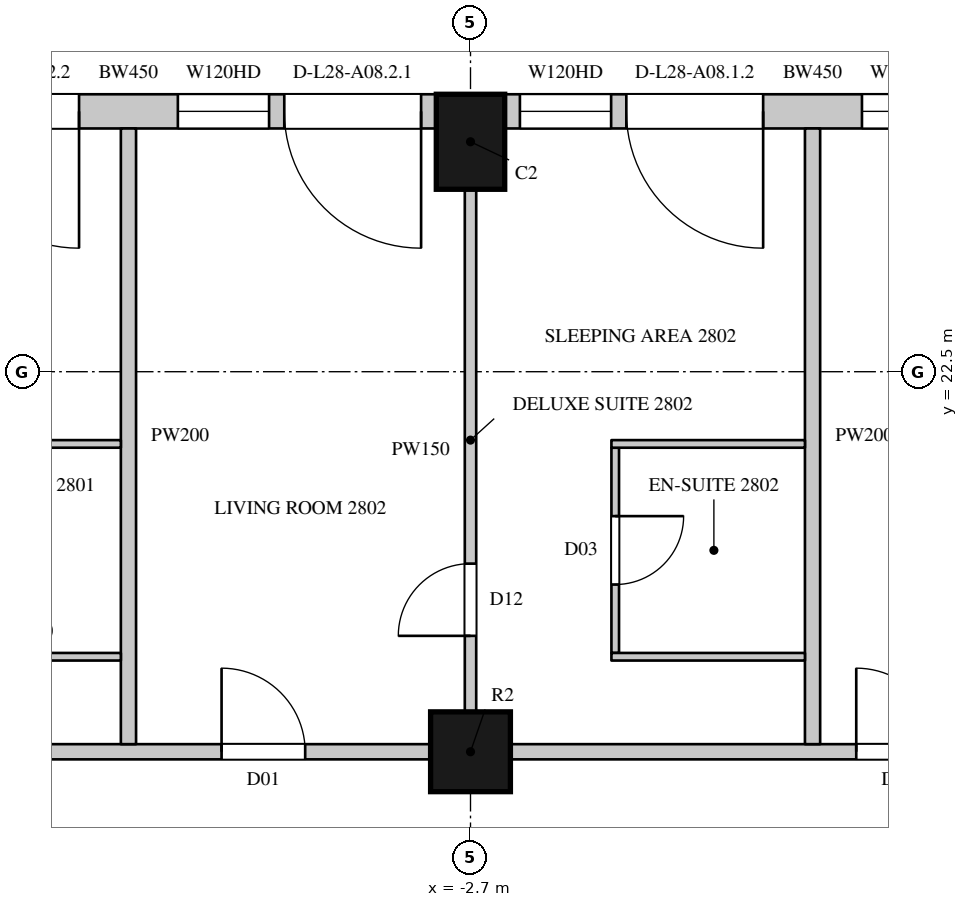
"""IFC4 building model, lengths in metres.
Left out: names, types, materials, properties, quantities, classifications, styles, units other than length and angle.
Written with IfcOpenShell. Run it as: python <this file> out.ifc"""

import sys

from ifc_helpers import new_model, si_unit, direction, frame, frame_2d, origin, origin_2d, place, context, subcontext, project, spatial, rectangle, circle, extrude, element, fill, save


model = new_model("IFC4")
c1 = context("Model", 3, precision=1e-05, world=origin(), true_north=direction((0.0, 1.0)))
c2 = subcontext(c1, "Body", "Model", "MODEL_VIEW")
j1 = project(units=[si_unit("LENGTHUNIT", "METRE"), si_unit("PLANEANGLEUNIT", "RADIAN")], contexts=[c1])
p1 = place(None, origin())
s1 = spatial("IfcSite", under=j1, at=p1, CompositionType="ELEMENT")
p2 = place(p1, origin())
s2 = spatial("IfcBuilding", under=s1, at=p2, CompositionType="ELEMENT")
p3 = place(p2, frame((0.0, 0.0, 131.1)))
s3 = spatial("IfcBuildingStorey", under=s2, at=p3, CompositionType="ELEMENT", Elevation=131.1)
p4 = place(p3, frame((-2.7, 25.525, 0.0), z_axis=(0.0, 0.0, 1.0), x_axis=(-1.0, 0.0, 0.0)))
e1 = element("IfcColumn", 1, at=p4, inside=s3, PredefinedType="COLUMN", context=c2, shape_type="SweptSolid", body=[
    extrude(rectangle(XDim=0.9, YDim=1.25, at=origin_2d()), origin(), (0.0, 0.0, 1.0), 3.6),
])
p5 = place(p3, frame((-2.7, 17.5, 0.0), z_axis=(0.0, 0.0, 1.0), x_axis=(1.0, 0.0, 0.0)))
e2 = element("IfcColumn", 2, at=p5, inside=s3, PredefinedType="COLUMN", context=c2, shape_type="SweptSolid", body=[
    extrude(circle(Radius=0.525, at=origin_2d()), origin(), (0.0, 0.0, 1.0), 3.6),
])
p6 = place(p3, frame((5.85, 25.925, 0.0), z_axis=(0.0, 0.0, 1.0), x_axis=(-1.0, 0.0, 0.0)))
e3 = element("IfcWall", 3, at=p6, inside=s3, PredefinedType="SOLIDWALL", context=c2, shape_type="SweptSolid", body=[
    extrude(rectangle(XDim=8.1, YDim=0.45, at=frame_2d((4.05, 0.0))), origin(), (0.0, 0.0, 1.0), 3.3),
])
p7 = place(p6, frame((0.2, 0.0, 0.0)))
e4 = element("IfcOpeningElement", 4, at=p7, cuts=e3, PredefinedType="OPENING", context=c2, shape_type="SweptSolid", body=[
    extrude(rectangle(XDim=1.8, YDim=2.4, at=frame_2d((0.9, 1.2))), frame((0.0, 0.235, 0.0), z_axis=(0.0, -1.0, 0.0), x_axis=(1.0, 0.0, 0.0)), (0.0, 0.0, 1.0), 0.47),
])
p8 = place(p6, frame((2.2, 0.0, 1.05)))
e5 = element("IfcOpeningElement", 5, at=p8, cuts=e3, PredefinedType="OPENING", context=c2, shape_type="SweptSolid", body=[
    extrude(rectangle(XDim=1.2, YDim=2.0, at=frame_2d((0.6, 1.0))), frame((0.0, 0.235, 0.0), z_axis=(0.0, -1.0, 0.0), x_axis=(1.0, 0.0, 0.0)), (0.0, 0.0, 1.0), 0.47),
])
p9 = place(p6, frame((4.7, 0.0, 0.0)))
e6 = element("IfcOpeningElement", 6, at=p9, cuts=e3, PredefinedType="OPENING", context=c2, shape_type="SweptSolid", body=[
    extrude(rectangle(XDim=1.8, YDim=2.4, at=frame_2d((0.9, 1.2))), frame((0.0, 0.235, 0.0), z_axis=(0.0, -1.0, 0.0), x_axis=(1.0, 0.0, 0.0)), (0.0, 0.0, 1.0), 0.47),
])
p10 = place(p6, frame((6.7, 0.0, 1.05)))
e7 = element("IfcOpeningElement", 7, at=p10, cuts=e3, PredefinedType="OPENING", context=c2, shape_type="SweptSolid", body=[
    extrude(rectangle(XDim=1.2, YDim=2.0, at=frame_2d((0.6, 1.0))), frame((0.0, 0.235, 0.0), z_axis=(0.0, -1.0, 0.0), x_axis=(1.0, 0.0, 0.0)), (0.0, 0.0, 1.0), 0.47),
])
p11 = place(p3, frame((-3.15, 25.925, 0.0), z_axis=(0.0, 0.0, 1.0), x_axis=(-1.0, 0.0, 0.0)))
e8 = element("IfcWall", 8, at=p11, inside=s3, PredefinedType="SOLIDWALL", context=c2, shape_type="SweptSolid", body=[
    extrude(rectangle(XDim=8.1, YDim=0.45, at=frame_2d((4.05, 0.0))), origin(), (0.0, 0.0, 1.0), 3.3),
])
p12 = place(p11, frame((0.2, 0.0, 0.0)))
e9 = element("IfcOpeningElement", 9, at=p12, cuts=e8, PredefinedType="OPENING", context=c2, shape_type="SweptSolid", body=[
    extrude(rectangle(XDim=1.8, YDim=2.4, at=frame_2d((0.9, 1.2))), frame((0.0, 0.235, 0.0), z_axis=(0.0, -1.0, 0.0), x_axis=(1.0, 0.0, 0.0)), (0.0, 0.0, 1.0), 0.47),
])
p13 = place(p11, frame((2.2, 0.0, 1.05)))
e10 = element("IfcOpeningElement", 10, at=p13, cuts=e8, PredefinedType="OPENING", context=c2, shape_type="SweptSolid", body=[
    extrude(rectangle(XDim=1.2, YDim=2.0, at=frame_2d((0.6, 1.0))), frame((0.0, 0.235, 0.0), z_axis=(0.0, -1.0, 0.0), x_axis=(1.0, 0.0, 0.0)), (0.0, 0.0, 1.0), 0.47),
])
p14 = place(p11, frame((4.7, 0.0, 0.0)))
e11 = element("IfcOpeningElement", 11, at=p14, cuts=e8, PredefinedType="OPENING", context=c2, shape_type="SweptSolid", body=[
    extrude(rectangle(XDim=1.8, YDim=2.4, at=frame_2d((0.9, 1.2))), frame((0.0, 0.235, 0.0), z_axis=(0.0, -1.0, 0.0), x_axis=(1.0, 0.0, 0.0)), (0.0, 0.0, 1.0), 0.47),
])
p15 = place(p11, frame((6.7, 0.0, 1.05)))
e12 = element("IfcOpeningElement", 12, at=p15, cuts=e8, PredefinedType="OPENING", context=c2, shape_type="SweptSolid", body=[
    extrude(rectangle(XDim=1.2, YDim=2.0, at=frame_2d((0.6, 1.0))), frame((0.0, 0.235, 0.0), z_axis=(0.0, -1.0, 0.0), x_axis=(1.0, 0.0, 0.0)), (0.0, 0.0, 1.0), 0.47),
])
p16 = place(p3, frame((-11.175, 17.5, 0.0), z_axis=(0.0, 0.0, 1.0), x_axis=(1.0, 0.0, 0.0)))
e13 = element("IfcWall", 13, at=p16, inside=s3, PredefinedType="PARTITIONING", context=c2, shape_type="SweptSolid", body=[
    extrude(rectangle(XDim=7.95, YDim=0.2, at=frame_2d((3.975, 0.0))), origin(), (0.0, 0.0, 1.0), 2.75),
])
p17 = place(p16, frame((5.2, 0.0, 0.0)))
e14 = element("IfcOpeningElement", 14, at=p17, cuts=e13, PredefinedType="OPENING", context=c2, shape_type="SweptSolid", body=[
    extrude(rectangle(XDim=1.1, YDim=2.4, at=frame_2d((0.55, 1.2))), frame((0.0, 0.11, 0.0), z_axis=(0.0, -1.0, 0.0), x_axis=(1.0, 0.0, 0.0)), (0.0, 0.0, 1.0), 0.22),
])
p18 = place(p3, frame((-2.175, 17.5, 0.0), z_axis=(0.0, 0.0, 1.0), x_axis=(1.0, 0.0, 0.0)))
e15 = element("IfcWall", 15, at=p18, inside=s3, PredefinedType="PARTITIONING", context=c2, shape_type="SweptSolid", body=[
    extrude(rectangle(XDim=7.95, YDim=0.2, at=frame_2d((3.975, 0.0))), origin(), (0.0, 0.0, 1.0), 2.75),
])
p19 = place(p18, frame((4.55, 0.0, 0.0)))
e16 = element("IfcOpeningElement", 16, at=p19, cuts=e15, PredefinedType="OPENING", context=c2, shape_type="SweptSolid", body=[
    extrude(rectangle(XDim=1.1, YDim=2.4, at=frame_2d((0.55, 1.2))), frame((0.0, 0.11, 0.0), z_axis=(0.0, -1.0, 0.0), x_axis=(1.0, 0.0, 0.0)), (0.0, 0.0, 1.0), 0.22),
])
p20 = place(p3, frame((-2.7, 18.025, 0.0), z_axis=(0.0, 0.0, 1.0), x_axis=(0.0, 1.0, 0.0)))
e17 = element("IfcWall", 17, at=p20, inside=s3, PredefinedType="PARTITIONING", context=c2, shape_type="SweptSolid", body=[
    extrude(rectangle(XDim=6.875, YDim=0.15, at=frame_2d((3.438, 0.0))), origin(), (0.0, 0.0, 1.0), 2.75),
])
p21 = place(p20, frame((1.0, 0.0, 0.0)))
e18 = element("IfcOpeningElement", 18, at=p21, cuts=e17, PredefinedType="OPENING", context=c2, shape_type="SweptSolid", body=[
    extrude(rectangle(XDim=0.95, YDim=2.2, at=frame_2d((0.475, 1.1))), frame((0.0, 0.085, 0.0), z_axis=(0.0, -1.0, 0.0), x_axis=(1.0, 0.0, 0.0)), (0.0, 0.0, 1.0), 0.17),
])
for number, where, z_axis, x_axis in (
    (19, (-7.2, 17.6, 0.0), (0.0, 0.0, 1.0), (0.0, 1.0, 0.0)),
    (20, (1.8, 17.6, 0.0), (0.0, 0.0, 1.0), (0.0, 1.0, 0.0)),
):
    element("IfcWall", number, at=place(p3, frame(where, z_axis=z_axis, x_axis=x_axis)), inside=s3, PredefinedType="PARTITIONING", context=c2, shape_type="SweptSolid", body=[
        extrude(rectangle(XDim=8.1, YDim=0.2, at=frame_2d((4.05, 0.0))), origin(), (0.0, 0.0, 1.0), 2.65),
    ])
for number, where, z_axis, x_axis in (
    (21, (-9.846, 18.75, 0.0), (0.0, 0.0, 1.0), (1.0, 0.0, 0.0)),
    (22, (-9.846, 21.55, 0.0), (0.0, 0.0, 1.0), (1.0, 0.0, 0.0)),
):
    element("IfcWall", number, at=place(p3, frame(where, z_axis=z_axis, x_axis=x_axis)), inside=s3, PredefinedType="PARTITIONING", context=c2, shape_type="SweptSolid", body=[
        extrude(rectangle(XDim=2.546, YDim=0.1, at=frame_2d((1.273, 0.0))), origin(), (0.0, 0.0, 1.0), 3.3),
    ])
p22 = place(p3, frame((-0.796, 18.8, 0.0), z_axis=(0.0, 0.0, 1.0), x_axis=(0.0, 1.0, 0.0)))
e23 = element("IfcWall", 23, at=p22, inside=s3, PredefinedType="PARTITIONING", context=c2, shape_type="SweptSolid", body=[
    extrude(rectangle(XDim=2.7, YDim=0.1, at=frame_2d((1.35, 0.0))), origin(), (0.0, 0.0, 1.0), 3.3),
])
p23 = place(p22, frame((0.9, 0.0, 0.0)))
e24 = element("IfcOpeningElement", 24, at=p23, cuts=e23, PredefinedType="OPENING", context=c2, shape_type="SweptSolid", body=[
    extrude(rectangle(XDim=0.9, YDim=2.2, at=frame_2d((0.45, 1.1))), frame((0.0, 0.06, 0.0), z_axis=(0.0, -1.0, 0.0), x_axis=(1.0, 0.0, 0.0)), (0.0, 0.0, 1.0), 0.12),
])
for number, where, z_axis, x_axis in (
    (25, (-0.846, 18.75, 0.0), (0.0, 0.0, 1.0), (1.0, 0.0, 0.0)),
    (26, (-0.846, 21.55, 0.0), (0.0, 0.0, 1.0), (1.0, 0.0, 0.0)),
):
    element("IfcWall", number, at=place(p3, frame(where, z_axis=z_axis, x_axis=x_axis)), inside=s3, PredefinedType="PARTITIONING", context=c2, shape_type="SweptSolid", body=[
        extrude(rectangle(XDim=2.546, YDim=0.1, at=frame_2d((1.273, 0.0))), origin(), (0.0, 0.0, 1.0), 3.3),
    ])
p24 = place(p8, origin())
e27 = element("IfcWindow", 27, at=p24, inside=s3, PartitioningType="SINGLE_PANEL", PredefinedType="WINDOW", context=c2, shape_type="SweptSolid", body=[
    extrude(rectangle(XDim=1.2, YDim=2.0, at=frame_2d((0.6, 1.0))), frame((0.0, 0.135, 0.0), z_axis=(0.0, -1.0, 0.0), x_axis=(1.0, 0.0, 0.0)), (0.0, 0.0, 1.0), 0.06),
])
fill(e5, e27)
p25 = place(p9, origin())
e28 = element("IfcDoor", 28, at=p25, inside=s3, OperationType="SLIDING_TO_LEFT", PredefinedType="DOOR", context=c2, shape_type="SweptSolid", body=[
    extrude(rectangle(XDim=1.8, YDim=2.4, at=frame_2d((0.9, 1.2))), frame((0.0, 0.13, 0.0), z_axis=(0.0, -1.0, 0.0), x_axis=(1.0, 0.0, 0.0)), (0.0, 0.0, 1.0), 0.05),
])
fill(e6, e28)
p26 = place(p10, origin())
e29 = element("IfcWindow", 29, at=p26, inside=s3, PartitioningType="SINGLE_PANEL", PredefinedType="WINDOW", context=c2, shape_type="SweptSolid", body=[
    extrude(rectangle(XDim=1.2, YDim=2.0, at=frame_2d((0.6, 1.0))), frame((0.0, 0.135, 0.0), z_axis=(0.0, -1.0, 0.0), x_axis=(1.0, 0.0, 0.0)), (0.0, 0.0, 1.0), 0.06),
])
fill(e7, e29)
p27 = place(p12, origin())
e30 = element("IfcDoor", 30, at=p27, inside=s3, OperationType="SLIDING_TO_LEFT", PredefinedType="DOOR", context=c2, shape_type="SweptSolid", body=[
    extrude(rectangle(XDim=1.8, YDim=2.4, at=frame_2d((0.9, 1.2))), frame((0.0, 0.13, 0.0), z_axis=(0.0, -1.0, 0.0), x_axis=(1.0, 0.0, 0.0)), (0.0, 0.0, 1.0), 0.05),
])
fill(e9, e30)
p28 = place(p13, origin())
e31 = element("IfcWindow", 31, at=p28, inside=s3, PartitioningType="SINGLE_PANEL", PredefinedType="WINDOW", context=c2, shape_type="SweptSolid", body=[
    extrude(rectangle(XDim=1.2, YDim=2.0, at=frame_2d((0.6, 1.0))), frame((0.0, 0.135, 0.0), z_axis=(0.0, -1.0, 0.0), x_axis=(1.0, 0.0, 0.0)), (0.0, 0.0, 1.0), 0.06),
])
fill(e10, e31)
p29 = place(p14, origin())
e32 = element("IfcDoor", 32, at=p29, inside=s3, OperationType="SLIDING_TO_LEFT", PredefinedType="DOOR", context=c2, shape_type="SweptSolid", body=[
    extrude(rectangle(XDim=1.8, YDim=2.4, at=frame_2d((0.9, 1.2))), frame((0.0, 0.13, 0.0), z_axis=(0.0, -1.0, 0.0), x_axis=(1.0, 0.0, 0.0)), (0.0, 0.0, 1.0), 0.05),
])
fill(e11, e32)
p30 = place(p17, origin())
e33 = element("IfcDoor", 33, at=p30, inside=s3, OperationType="SINGLE_SWING_LEFT", PredefinedType="DOOR", context=c2, shape_type="SweptSolid", body=[
    extrude(rectangle(XDim=1.1, YDim=2.4, at=frame_2d((0.55, 1.2))), frame((0.0, 0.025, 0.0), z_axis=(0.0, -1.0, 0.0), x_axis=(1.0, 0.0, 0.0)), (0.0, 0.0, 1.0), 0.05),
])
fill(e14, e33)
p31 = place(p21, origin())
e34 = element("IfcDoor", 34, at=p31, inside=s3, OperationType="SINGLE_SWING_LEFT", PredefinedType="DOOR", context=c2, shape_type="SweptSolid", body=[
    extrude(rectangle(XDim=0.95, YDim=2.2, at=frame_2d((0.475, 1.1))), frame((0.0, 0.025, 0.0), z_axis=(0.0, -1.0, 0.0), x_axis=(1.0, 0.0, 0.0)), (0.0, 0.0, 1.0), 0.05),
])
fill(e18, e34)
p32 = place(p23, origin())
e35 = element("IfcDoor", 35, at=p32, inside=s3, OperationType="SINGLE_SWING_LEFT", PredefinedType="DOOR", context=c2, shape_type="SweptSolid", body=[
    extrude(rectangle(XDim=0.9, YDim=2.2, at=frame_2d((0.45, 1.1))), frame((0.0, 0.025, 0.0), z_axis=(0.0, -1.0, 0.0), x_axis=(1.0, 0.0, 0.0)), (0.0, 0.0, 1.0), 0.05),
])
fill(e24, e35)
p33 = place(p19, origin())
e36 = element("IfcDoor", 36, at=p33, inside=s3, OperationType="SINGLE_SWING_LEFT", PredefinedType="DOOR", context=c2, shape_type="SweptSolid", body=[
    extrude(rectangle(XDim=1.1, YDim=2.4, at=frame_2d((0.55, 1.2))), frame((0.0, 0.025, 0.0), z_axis=(0.0, -1.0, 0.0), x_axis=(1.0, 0.0, 0.0)), (0.0, 0.0, 1.0), 0.05),
])
fill(e16, e36)
save(model, sys.argv[1])
